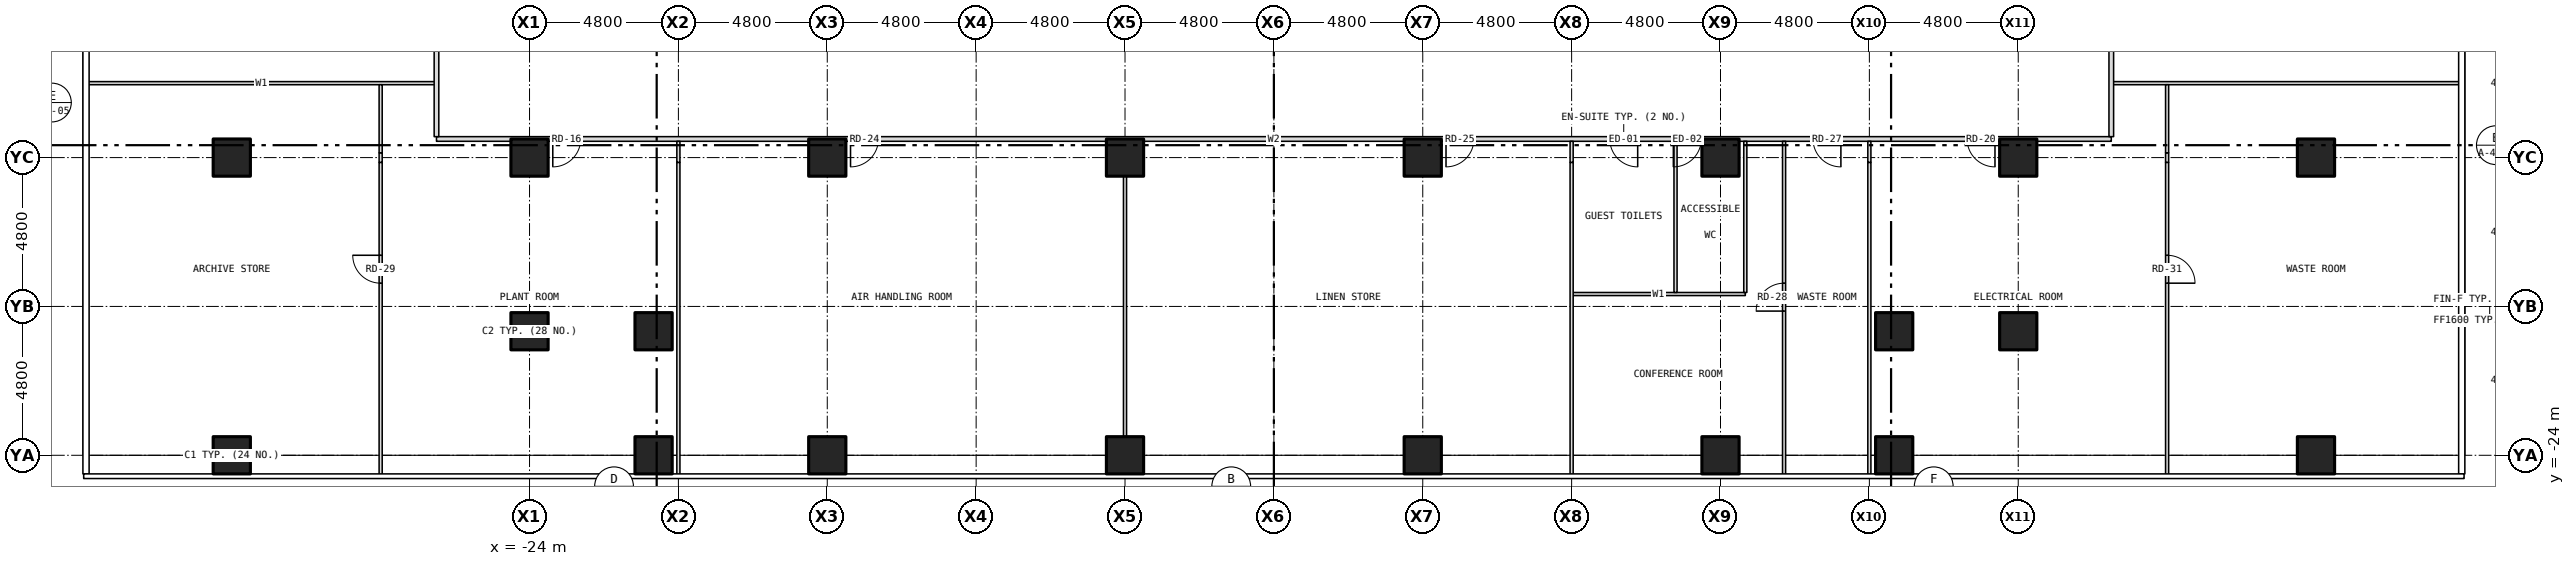
"""IFC4 building model, lengths in metres.
Left out: names, types, materials, properties, quantities, classifications, styles, units other than length and angle.
Written with IfcOpenShell. Run it as: python <this file> out.ifc"""

import sys

from ifc_helpers import new_model, si_unit, direction, frame, frame_2d, origin, origin_2d, place, context, subcontext, project, spatial, rectangle, hollow_rectangle, extrude, element, fill, save


model = new_model("IFC4")
c1 = context("Model", 3, precision=1e-05, world=origin(), true_north=direction((0.0, 1.0)))
c2 = subcontext(c1, "Body", "Model", "MODEL_VIEW")
j1 = project(units=[si_unit("LENGTHUNIT", "METRE"), si_unit("PLANEANGLEUNIT", "RADIAN")], contexts=[c1])
p1 = place(None, origin())
s1 = spatial("IfcSite", under=j1, at=p1, CompositionType="ELEMENT")
p2 = place(p1, origin())
s2 = spatial("IfcBuilding", under=s1, at=p2, CompositionType="ELEMENT")
p3 = place(p2, frame((0.0, 0.0, 15.5)))
s3 = spatial("IfcBuildingStorey", under=s2, at=p3, CompositionType="ELEMENT", Elevation=15.5)
for number, where, z_axis, x_axis in (
    (1, (-33.6, -24.0, -0.2), (0.0, 0.0, 1.0), (1.0, 0.0, 0.0)),
    (2, (-33.6, -14.4, -0.2), (0.0, 0.0, 1.0), (1.0, 0.0, 0.0)),
    (3, (-20.0, -24.0, -0.2), (0.0, 0.0, 1.0), (1.0, 0.0, 0.0)),
    (4, (-14.4, -24.0, -0.2), (0.0, 0.0, 1.0), (1.0, 0.0, 0.0)),
    (5, (-4.8, -24.0, -0.2), (0.0, 0.0, 1.0), (1.0, 0.0, 0.0)),
    (6, (4.8, -24.0, -0.2), (0.0, 0.0, 1.0), (1.0, 0.0, 0.0)),
    (7, (14.4, -24.0, -0.2), (0.0, 0.0, 1.0), (1.0, 0.0, 0.0)),
    (8, (20.0, -24.0, -0.2), (0.0, 0.0, 1.0), (1.0, 0.0, 0.0)),
    (9, (33.6, -24.0, -0.2), (0.0, 0.0, 1.0), (1.0, 0.0, 0.0)),
    (10, (33.6, -14.4, -0.2), (0.0, 0.0, 1.0), (1.0, 0.0, 0.0)),
    (11, (-24.0, -20.0, -0.2), (0.0, 0.0, 1.0), (1.0, 0.0, 0.0)),
    (12, (-24.0, -14.4, -0.2), (0.0, 0.0, 1.0), (1.0, 0.0, 0.0)),
    (13, (-20.0, -20.0, -0.2), (0.0, 0.0, 1.0), (1.0, 0.0, 0.0)),
    (14, (-14.4, -14.4, -0.2), (0.0, 0.0, 1.0), (1.0, 0.0, 0.0)),
    (15, (-4.8, -14.4, -0.2), (0.0, 0.0, 1.0), (1.0, 0.0, 0.0)),
    (16, (4.8, -14.4, -0.2), (0.0, 0.0, 1.0), (1.0, 0.0, 0.0)),
    (17, (14.4, -14.4, -0.2), (0.0, 0.0, 1.0), (1.0, 0.0, 0.0)),
    (18, (20.0, -20.0, -0.2), (0.0, 0.0, 1.0), (1.0, 0.0, 0.0)),
    (19, (24.0, -20.0, -0.2), (0.0, 0.0, 1.0), (1.0, 0.0, 0.0)),
    (20, (24.0, -14.4, -0.2), (0.0, 0.0, 1.0), (1.0, 0.0, 0.0)),
):
    element("IfcColumn", number, at=place(p3, frame(where, z_axis=z_axis, x_axis=x_axis)), inside=s3, PredefinedType="COLUMN", context=c2, shape_type="SweptSolid", body=[
        extrude(hollow_rectangle(XDim=1.2, YDim=1.2, WallThickness=0.07, at=origin_2d()), origin(), (0.0, 0.0, 1.0), 4.5),
    ])
p4 = place(p3, frame((9.6, -18.8, 0.0), z_axis=(0.0, 0.0, 1.0), x_axis=(1.0, 0.0, 0.0)))
e21 = element("IfcWall", 21, at=p4, inside=s3, PredefinedType="PARTITIONING", context=c2, shape_type="SweptSolid", body=[
    extrude(rectangle(XDim=5.6, YDim=0.1, at=frame_2d((2.8, 0.0))), origin(), (0.0, 0.0, 1.0), 4.3),
])
p5 = place(p3, frame((-27.0, -13.8, 0.0), z_axis=(0.0, 0.0, 1.0), x_axis=(1.0, 0.0, 0.0)))
e22 = element("IfcWall", 22, at=p5, inside=s3, PredefinedType="PARTITIONING", context=c2, shape_type="SweptSolid", body=[
    extrude(rectangle(XDim=54.0, YDim=0.15, at=frame_2d((27.0, 0.0))), origin(), (0.0, 0.0, 1.0), 4.3),
])
p6 = place(p5, frame((37.83, 0.0, 0.0)))
e23 = element("IfcOpeningElement", 23, at=p6, cuts=e22, PredefinedType="OPENING", context=c2, shape_type="SweptSolid", body=[
    extrude(rectangle(XDim=0.9, YDim=2.1, at=frame_2d((0.45, 1.05))), frame((0.0, 0.087, 0.0), z_axis=(0.0, -1.0, 0.0), x_axis=(1.0, 0.0, 0.0)), (0.0, 0.0, 1.0), 0.174),
])
p7 = place(p5, frame((39.88, 0.0, 0.0)))
e24 = element("IfcOpeningElement", 24, at=p7, cuts=e22, PredefinedType="OPENING", context=c2, shape_type="SweptSolid", body=[
    extrude(rectangle(XDim=0.9, YDim=2.1, at=frame_2d((0.45, 1.05))), frame((0.0, 0.087, 0.0), z_axis=(0.0, -1.0, 0.0), x_axis=(1.0, 0.0, 0.0)), (0.0, 0.0, 1.0), 0.174),
])
p8 = place(p5, frame((3.75, 0.0, 0.0)))
e25 = element("IfcOpeningElement", 25, at=p8, cuts=e22, PredefinedType="OPENING", context=c2, shape_type="SweptSolid", body=[
    extrude(rectangle(XDim=0.9, YDim=2.1, at=frame_2d((0.45, 1.05))), frame((0.0, 0.087, 0.0), z_axis=(0.0, -1.0, 0.0), x_axis=(1.0, 0.0, 0.0)), (0.0, 0.0, 1.0), 0.174),
])
p9 = place(p5, frame((49.35, 0.0, 0.0)))
e26 = element("IfcOpeningElement", 26, at=p9, cuts=e22, PredefinedType="OPENING", context=c2, shape_type="SweptSolid", body=[
    extrude(rectangle(XDim=0.9, YDim=2.1, at=frame_2d((0.45, 1.05))), frame((0.0, 0.087, 0.0), z_axis=(0.0, -1.0, 0.0), x_axis=(1.0, 0.0, 0.0)), (0.0, 0.0, 1.0), 0.174),
])
p10 = place(p5, frame((13.35, 0.0, 0.0)))
e27 = element("IfcOpeningElement", 27, at=p10, cuts=e22, PredefinedType="OPENING", context=c2, shape_type="SweptSolid", body=[
    extrude(rectangle(XDim=0.9, YDim=2.1, at=frame_2d((0.45, 1.05))), frame((0.0, 0.087, 0.0), z_axis=(0.0, -1.0, 0.0), x_axis=(1.0, 0.0, 0.0)), (0.0, 0.0, 1.0), 0.174),
])
p11 = place(p5, frame((32.55, 0.0, 0.0)))
e28 = element("IfcOpeningElement", 28, at=p11, cuts=e22, PredefinedType="OPENING", context=c2, shape_type="SweptSolid", body=[
    extrude(rectangle(XDim=0.9, YDim=2.1, at=frame_2d((0.45, 1.05))), frame((0.0, 0.087, 0.0), z_axis=(0.0, -1.0, 0.0), x_axis=(1.0, 0.0, 0.0)), (0.0, 0.0, 1.0), 0.174),
])
p12 = place(p5, frame((44.382, 0.0, 0.0)))
e29 = element("IfcOpeningElement", 29, at=p12, cuts=e22, PredefinedType="OPENING", context=c2, shape_type="SweptSolid", body=[
    extrude(rectangle(XDim=0.9, YDim=2.1, at=frame_2d((0.45, 1.05))), frame((0.0, 0.087, 0.0), z_axis=(0.0, -1.0, 0.0), x_axis=(1.0, 0.0, 0.0)), (0.0, 0.0, 1.0), 0.174),
])
for number, where, z_axis, x_axis in (
    (30, (-38.28, -12.0, 0.0), (0.0, 0.0, 1.0), (1.0, 0.0, 0.0)),
    (31, (27.0, -12.0, 0.0), (0.0, 0.0, 1.0), (1.0, 0.0, 0.0)),
):
    element("IfcWall", number, at=place(p3, frame(where, z_axis=z_axis, x_axis=x_axis)), inside=s3, PredefinedType="PARTITIONING", context=c2, shape_type="SweptSolid", body=[
        extrude(rectangle(XDim=11.28, YDim=0.1, at=frame_2d((5.64, 0.0))), origin(), (0.0, 0.0, 1.0), 4.3),
    ])
p13 = place(p3, frame((-28.8, -24.63, 0.0), z_axis=(0.0, 0.0, 1.0), x_axis=(0.0, 1.0, 0.0)))
e32 = element("IfcWall", 32, at=p13, inside=s3, PredefinedType="PARTITIONING", context=c2, shape_type="SweptSolid", body=[
    extrude(rectangle(XDim=10.076, YDim=0.1, at=frame_2d((5.038, 0.0))), origin(), (0.0, 0.0, 1.0), 3.683),
])
p14 = place(p13, frame((6.18, 0.0, 0.0)))
e33 = element("IfcOpeningElement", 33, at=p14, cuts=e32, PredefinedType="OPENING", context=c2, shape_type="SweptSolid", body=[
    extrude(rectangle(XDim=0.9, YDim=2.1, at=frame_2d((0.45, 1.05))), frame((0.0, 0.062, 0.0), z_axis=(0.0, -1.0, 0.0), x_axis=(1.0, 0.0, 0.0)), (0.0, 0.0, 1.0), 0.124),
])
p15 = place(p3, frame((-28.8, -14.554, 0.0), z_axis=(0.0, 0.0, 1.0), x_axis=(0.0, 1.0, 0.0)))
e34 = element("IfcWall", 34, at=p15, inside=s3, PredefinedType="PARTITIONING", context=c2, shape_type="SweptSolid", body=[
    extrude(rectangle(XDim=0.308, YDim=0.1, at=frame_2d((0.154, 0.0))), origin(), (0.0, 0.0, 1.0), 4.3),
])
p16 = place(p3, frame((-28.8, -14.246, 0.0), z_axis=(0.0, 0.0, 1.0), x_axis=(0.0, 1.0, 0.0)))
e35 = element("IfcWall", 35, at=p16, inside=s3, PredefinedType="PARTITIONING", context=c2, shape_type="SweptSolid", body=[
    extrude(rectangle(XDim=2.196, YDim=0.1, at=frame_2d((1.098, 0.0))), origin(), (0.0, 0.0, 1.0), 3.683),
])
p17 = place(p3, frame((-27.0, -13.725, 0.0), z_axis=(0.0, 0.0, 1.0), x_axis=(0.0, 1.0, 0.0)))
e36 = element("IfcWall", 36, at=p17, inside=s3, PredefinedType="PARTITIONING", context=c2, shape_type="SweptSolid", body=[
    extrude(rectangle(XDim=27.45, YDim=0.15, at=frame_2d((13.725, 0.0))), origin(), (0.0, 0.0, 1.0), 4.3),
])
p18 = place(p17, frame((7.275, 0.0, 0.0)))
e37 = element("IfcOpeningElement", 37, at=p18, cuts=e36, PredefinedType="OPENING", context=c2, shape_type="SweptSolid", body=[
    extrude(rectangle(XDim=0.9, YDim=2.1, at=frame_2d((0.45, 1.05))), frame((0.0, 0.087, 0.0), z_axis=(0.0, -1.0, 0.0), x_axis=(1.0, 0.0, 0.0)), (0.0, 0.0, 1.0), 0.174),
])
p19 = place(p17, frame((19.275, 0.0, 0.0)))
e38 = element("IfcOpeningElement", 38, at=p19, cuts=e36, PredefinedType="OPENING", context=c2, shape_type="SweptSolid", body=[
    extrude(rectangle(XDim=0.9, YDim=2.1, at=frame_2d((0.45, 1.05))), frame((0.0, 0.087, 0.0), z_axis=(0.0, -1.0, 0.0), x_axis=(1.0, 0.0, 0.0)), (0.0, 0.0, 1.0), 0.174),
])
p20 = place(p3, frame((-19.2, -24.63, 0.0), z_axis=(0.0, 0.0, 1.0), x_axis=(0.0, 1.0, 0.0)))
e39 = element("IfcWall", 39, at=p20, inside=s3, PredefinedType="PARTITIONING", context=c2, shape_type="SweptSolid", body=[
    extrude(rectangle(XDim=10.076, YDim=0.1, at=frame_2d((5.038, 0.0))), origin(), (0.0, 0.0, 1.0), 3.683),
])
p21 = place(p3, frame((-19.2, -14.554, 0.0), z_axis=(0.0, 0.0, 1.0), x_axis=(0.0, 1.0, 0.0)))
e40 = element("IfcWall", 40, at=p21, inside=s3, PredefinedType="PARTITIONING", context=c2, shape_type="SweptSolid", body=[
    extrude(rectangle(XDim=0.679, YDim=0.1, at=frame_2d((0.339, 0.0))), origin(), (0.0, 0.0, 1.0), 4.3),
])
p22 = place(p3, frame((-4.8, -23.88, 0.0), z_axis=(0.0, 0.0, 1.0), x_axis=(0.0, 1.0, 0.0)))
e41 = element("IfcWall", 41, at=p22, inside=s3, PredefinedType="PARTITIONING", context=c2, shape_type="SweptSolid", body=[
    extrude(rectangle(XDim=0.48, YDim=0.1, at=frame_2d((0.24, 0.0))), origin(), (0.0, 0.0, 1.0), 4.3),
])
p23 = place(p3, frame((-4.8, -23.4, 0.0), z_axis=(0.0, 0.0, 1.0), x_axis=(0.0, 1.0, 0.0)))
e42 = element("IfcWall", 42, at=p23, inside=s3, PredefinedType="PARTITIONING", context=c2, shape_type="SweptSolid", body=[
    extrude(rectangle(XDim=8.4, YDim=0.1, at=frame_2d((4.2, 0.0))), origin(), (0.0, 0.0, 1.0), 3.373),
])
p24 = place(p3, frame((-4.8, -15.0, 0.0), z_axis=(0.0, 0.0, 1.0), x_axis=(0.0, 1.0, 0.0)))
e43 = element("IfcWall", 43, at=p24, inside=s3, PredefinedType="PARTITIONING", context=c2, shape_type="SweptSolid", body=[
    extrude(rectangle(XDim=1.125, YDim=0.1, at=frame_2d((0.562, 0.0))), origin(), (0.0, 0.0, 1.0), 4.3),
])
p25 = place(p3, frame((9.6, -24.63, 0.0), z_axis=(0.0, 0.0, 1.0), x_axis=(0.0, 1.0, 0.0)))
e44 = element("IfcWall", 44, at=p25, inside=s3, PredefinedType="PARTITIONING", context=c2, shape_type="SweptSolid", body=[
    extrude(rectangle(XDim=10.076, YDim=0.1, at=frame_2d((5.038, 0.0))), origin(), (0.0, 0.0, 1.0), 3.683),
])
p26 = place(p3, frame((9.6, -14.554, 0.0), z_axis=(0.0, 0.0, 1.0), x_axis=(0.0, 1.0, 0.0)))
e45 = element("IfcWall", 45, at=p26, inside=s3, PredefinedType="PARTITIONING", context=c2, shape_type="SweptSolid", body=[
    extrude(rectangle(XDim=0.679, YDim=0.1, at=frame_2d((0.339, 0.0))), origin(), (0.0, 0.0, 1.0), 4.3),
])
for number, where, z_axis, x_axis in (
    (46, (12.95, -18.75, 0.0), (0.0, 0.0, 1.0), (0.0, 1.0, 0.0)),
    (47, (15.2, -18.75, 0.0), (0.0, 0.0, 1.0), (0.0, 1.0, 0.0)),
):
    element("IfcWall", number, at=place(p3, frame(where, z_axis=z_axis, x_axis=x_axis)), inside=s3, PredefinedType="PARTITIONING", context=c2, shape_type="SweptSolid", body=[
        extrude(rectangle(XDim=4.875, YDim=0.1, at=frame_2d((2.438, 0.0))), origin(), (0.0, 0.0, 1.0), 4.3),
    ])
p27 = place(p3, frame((16.45, -24.63, 0.0), z_axis=(0.0, 0.0, 1.0), x_axis=(0.0, 1.0, 0.0)))
e48 = element("IfcWall", 48, at=p27, inside=s3, PredefinedType="PARTITIONING", context=c2, shape_type="SweptSolid", body=[
    extrude(rectangle(XDim=10.755, YDim=0.1, at=frame_2d((5.377, 0.0))), origin(), (0.0, 0.0, 1.0), 4.3),
])
p28 = place(p27, frame((5.28, 0.0, 0.0)))
e49 = element("IfcOpeningElement", 49, at=p28, cuts=e48, PredefinedType="OPENING", context=c2, shape_type="SweptSolid", body=[
    extrude(rectangle(XDim=0.9, YDim=2.1, at=frame_2d((0.45, 1.05))), frame((0.0, 0.062, 0.0), z_axis=(0.0, -1.0, 0.0), x_axis=(1.0, 0.0, 0.0)), (0.0, 0.0, 1.0), 0.124),
])
p29 = place(p3, frame((19.2, -24.63, 0.0), z_axis=(0.0, 0.0, 1.0), x_axis=(0.0, 1.0, 0.0)))
e50 = element("IfcWall", 50, at=p29, inside=s3, PredefinedType="PARTITIONING", context=c2, shape_type="SweptSolid", body=[
    extrude(rectangle(XDim=10.076, YDim=0.1, at=frame_2d((5.038, 0.0))), origin(), (0.0, 0.0, 1.0), 3.683),
])
p30 = place(p3, frame((19.2, -14.554, 0.0), z_axis=(0.0, 0.0, 1.0), x_axis=(0.0, 1.0, 0.0)))
e51 = element("IfcWall", 51, at=p30, inside=s3, PredefinedType="PARTITIONING", context=c2, shape_type="SweptSolid", body=[
    extrude(rectangle(XDim=0.679, YDim=0.1, at=frame_2d((0.339, 0.0))), origin(), (0.0, 0.0, 1.0), 4.3),
])
p31 = place(p3, frame((27.0, -13.725, 0.0), z_axis=(0.0, 0.0, 1.0), x_axis=(0.0, 1.0, 0.0)))
e52 = element("IfcWall", 52, at=p31, inside=s3, PredefinedType="PARTITIONING", context=c2, shape_type="SweptSolid", body=[
    extrude(rectangle(XDim=27.45, YDim=0.15, at=frame_2d((13.725, 0.0))), origin(), (0.0, 0.0, 1.0), 4.3),
])
p32 = place(p31, frame((7.275, 0.0, 0.0)))
e53 = element("IfcOpeningElement", 53, at=p32, cuts=e52, PredefinedType="OPENING", context=c2, shape_type="SweptSolid", body=[
    extrude(rectangle(XDim=0.9, YDim=2.1, at=frame_2d((0.45, 1.05))), frame((0.0, 0.087, 0.0), z_axis=(0.0, -1.0, 0.0), x_axis=(1.0, 0.0, 0.0)), (0.0, 0.0, 1.0), 0.174),
])
p33 = place(p31, frame((19.275, 0.0, 0.0)))
e54 = element("IfcOpeningElement", 54, at=p33, cuts=e52, PredefinedType="OPENING", context=c2, shape_type="SweptSolid", body=[
    extrude(rectangle(XDim=0.9, YDim=2.1, at=frame_2d((0.45, 1.05))), frame((0.0, 0.087, 0.0), z_axis=(0.0, -1.0, 0.0), x_axis=(1.0, 0.0, 0.0)), (0.0, 0.0, 1.0), 0.174),
])
p34 = place(p3, frame((28.8, -24.63, 0.0), z_axis=(0.0, 0.0, 1.0), x_axis=(0.0, 1.0, 0.0)))
e55 = element("IfcWall", 55, at=p34, inside=s3, PredefinedType="PARTITIONING", context=c2, shape_type="SweptSolid", body=[
    extrude(rectangle(XDim=10.076, YDim=0.1, at=frame_2d((5.038, 0.0))), origin(), (0.0, 0.0, 1.0), 3.683),
])
p35 = place(p34, frame((6.18, 0.0, 0.0)))
e56 = element("IfcOpeningElement", 56, at=p35, cuts=e55, PredefinedType="OPENING", context=c2, shape_type="SweptSolid", body=[
    extrude(rectangle(XDim=0.9, YDim=2.1, at=frame_2d((0.45, 1.05))), frame((0.0, 0.062, 0.0), z_axis=(0.0, -1.0, 0.0), x_axis=(1.0, 0.0, 0.0)), (0.0, 0.0, 1.0), 0.124),
])
p36 = place(p3, frame((28.8, -14.554, 0.0), z_axis=(0.0, 0.0, 1.0), x_axis=(0.0, 1.0, 0.0)))
e57 = element("IfcWall", 57, at=p36, inside=s3, PredefinedType="PARTITIONING", context=c2, shape_type="SweptSolid", body=[
    extrude(rectangle(XDim=0.308, YDim=0.1, at=frame_2d((0.154, 0.0))), origin(), (0.0, 0.0, 1.0), 4.3),
])
p37 = place(p3, frame((28.8, -14.246, 0.0), z_axis=(0.0, 0.0, 1.0), x_axis=(0.0, 1.0, 0.0)))
e58 = element("IfcWall", 58, at=p37, inside=s3, PredefinedType="PARTITIONING", context=c2, shape_type="SweptSolid", body=[
    extrude(rectangle(XDim=2.196, YDim=0.1, at=frame_2d((1.098, 0.0))), origin(), (0.0, 0.0, 1.0), 3.683),
])
p38 = place(p6, origin())
e59 = element("IfcDoor", 59, at=p38, inside=s3, OperationType="SINGLE_SWING_RIGHT", PredefinedType="DOOR", context=c2, shape_type="SweptSolid", body=[
    extrude(rectangle(XDim=0.9, YDim=2.1, at=frame_2d((0.45, 1.05))), frame((0.0, 0.025, 0.0), z_axis=(0.0, -1.0, 0.0), x_axis=(1.0, 0.0, 0.0)), (0.0, 0.0, 1.0), 0.05),
])
fill(e23, e59)
p39 = place(p7, origin())
e60 = element("IfcDoor", 60, at=p39, inside=s3, OperationType="SINGLE_SWING_LEFT", PredefinedType="DOOR", context=c2, shape_type="SweptSolid", body=[
    extrude(rectangle(XDim=0.9, YDim=2.1, at=frame_2d((0.45, 1.05))), frame((0.0, 0.025, 0.0), z_axis=(0.0, -1.0, 0.0), x_axis=(1.0, 0.0, 0.0)), (0.0, 0.0, 1.0), 0.05),
])
fill(e24, e60)
p40 = place(p8, origin())
e61 = element("IfcDoor", 61, at=p40, inside=s3, OperationType="SINGLE_SWING_LEFT", PredefinedType="DOOR", context=c2, shape_type="SweptSolid", body=[
    extrude(rectangle(XDim=0.9, YDim=2.1, at=frame_2d((0.45, 1.05))), frame((0.0, 0.025, 0.0), z_axis=(0.0, -1.0, 0.0), x_axis=(1.0, 0.0, 0.0)), (0.0, 0.0, 1.0), 0.05),
])
fill(e25, e61)
p41 = place(p9, origin())
e62 = element("IfcDoor", 62, at=p41, inside=s3, OperationType="SINGLE_SWING_RIGHT", PredefinedType="DOOR", context=c2, shape_type="SweptSolid", body=[
    extrude(rectangle(XDim=0.9, YDim=2.1, at=frame_2d((0.45, 1.05))), frame((0.0, 0.025, 0.0), z_axis=(0.0, -1.0, 0.0), x_axis=(1.0, 0.0, 0.0)), (0.0, 0.0, 1.0), 0.05),
])
fill(e26, e62)
p42 = place(p10, origin())
e63 = element("IfcDoor", 63, at=p42, inside=s3, OperationType="SINGLE_SWING_LEFT", PredefinedType="DOOR", context=c2, shape_type="SweptSolid", body=[
    extrude(rectangle(XDim=0.9, YDim=2.1, at=frame_2d((0.45, 1.05))), frame((0.0, 0.025, 0.0), z_axis=(0.0, -1.0, 0.0), x_axis=(1.0, 0.0, 0.0)), (0.0, 0.0, 1.0), 0.05),
])
fill(e27, e63)
p43 = place(p11, origin())
e64 = element("IfcDoor", 64, at=p43, inside=s3, OperationType="SINGLE_SWING_LEFT", PredefinedType="DOOR", context=c2, shape_type="SweptSolid", body=[
    extrude(rectangle(XDim=0.9, YDim=2.1, at=frame_2d((0.45, 1.05))), frame((0.0, 0.025, 0.0), z_axis=(0.0, -1.0, 0.0), x_axis=(1.0, 0.0, 0.0)), (0.0, 0.0, 1.0), 0.05),
])
fill(e28, e64)
p44 = place(p12, origin())
e65 = element("IfcDoor", 65, at=p44, inside=s3, OperationType="SINGLE_SWING_RIGHT", PredefinedType="DOOR", context=c2, shape_type="SweptSolid", body=[
    extrude(rectangle(XDim=0.9, YDim=2.1, at=frame_2d((0.45, 1.05))), frame((0.0, 0.025, 0.0), z_axis=(0.0, -1.0, 0.0), x_axis=(1.0, 0.0, 0.0)), (0.0, 0.0, 1.0), 0.05),
])
fill(e29, e65)
p45 = place(p28, origin())
e66 = element("IfcDoor", 66, at=p45, inside=s3, OperationType="SINGLE_SWING_LEFT", PredefinedType="DOOR", context=c2, shape_type="SweptSolid", body=[
    extrude(rectangle(XDim=0.9, YDim=2.1, at=frame_2d((0.45, 1.05))), frame((0.0, 0.025, 0.0), z_axis=(0.0, -1.0, 0.0), x_axis=(1.0, 0.0, 0.0)), (0.0, 0.0, 1.0), 0.05),
])
fill(e49, e66)
p46 = place(p14, origin())
e67 = element("IfcDoor", 67, at=p46, inside=s3, OperationType="SINGLE_SWING_RIGHT", PredefinedType="DOOR", context=c2, shape_type="SweptSolid", body=[
    extrude(rectangle(XDim=0.9, YDim=2.1, at=frame_2d((0.45, 1.05))), frame((0.0, 0.025, 0.0), z_axis=(0.0, -1.0, 0.0), x_axis=(1.0, 0.0, 0.0)), (0.0, 0.0, 1.0), 0.05),
])
fill(e33, e67)
p47 = place(p35, origin())
e68 = element("IfcDoor", 68, at=p47, inside=s3, OperationType="SINGLE_SWING_LEFT", PredefinedType="DOOR", context=c2, shape_type="SweptSolid", body=[
    extrude(rectangle(XDim=0.9, YDim=2.1, at=frame_2d((0.45, 1.05))), frame((0.0, 0.025, 0.0), z_axis=(0.0, -1.0, 0.0), x_axis=(1.0, 0.0, 0.0)), (0.0, 0.0, 1.0), 0.05),
])
fill(e56, e68)
save(model, sys.argv[1])
